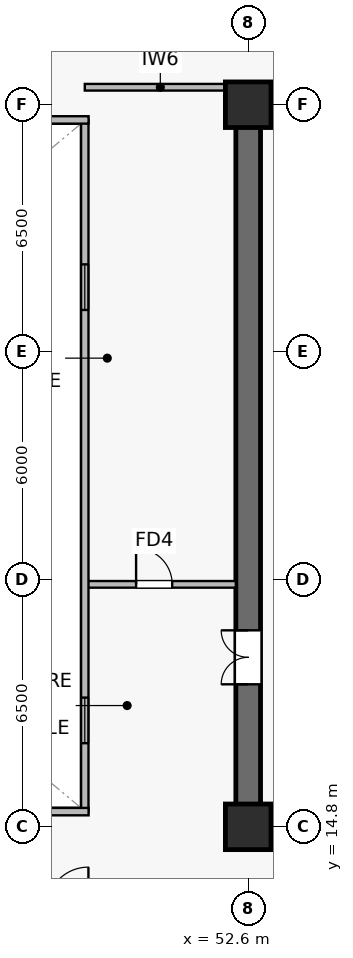
"""IFC4 building model, lengths in metres.
Left out: names, types, materials, properties, quantities, classifications, styles, units other than length and angle.
Written with IfcOpenShell. Run it as: python <this file> out.ifc"""

import sys

from ifc_helpers import new_model, si_unit, direction, frame, frame_2d, origin, origin_2d, place, context, subcontext, project, spatial, rectangle, extrude, source, transform, mapped, element, fill, save


model = new_model("IFC4")
c1 = context("Model", 3, precision=1e-05, world=origin(), true_north=direction((0.0, 1.0)))
c2 = subcontext(c1, "Body", "Model", "MODEL_VIEW")
j1 = project(units=[si_unit("LENGTHUNIT", "METRE"), si_unit("PLANEANGLEUNIT", "RADIAN")], contexts=[c1])
p1 = place(None, origin())
s1 = spatial("IfcSite", under=j1, at=p1, CompositionType="ELEMENT")
p2 = place(p1, origin())
s2 = spatial("IfcBuilding", under=s1, at=p2, CompositionType="ELEMENT")
p3 = place(p2, frame((0.0, 0.0, 170.7)))
s3 = spatial("IfcBuildingStorey", under=s2, at=p3, CompositionType="ELEMENT", Elevation=170.7)
p4 = place(p3, frame((52.275, 14.8, 0.0), z_axis=(0.0, 0.0, 1.0), x_axis=(1.0, 0.0, 0.0)))
e1 = element("IfcWall", 1, at=p4, inside=s3, PredefinedType="SHEAR", context=c2, shape_type="SweptSolid", body=[
    extrude(rectangle(XDim=15.45, YDim=0.65, at=frame_2d((7.725, 0.0))), origin(), (0.0, 0.0, 1.0), 3.79),
])
p5 = place(p3, frame((52.275, 33.8, 0.0), z_axis=(0.0, 0.0, 1.0), x_axis=(1.0, 0.0, 0.0)))
e2 = element("IfcWall", 2, at=p5, inside=s3, PredefinedType="SHEAR", context=c2, shape_type="SweptSolid", body=[
    extrude(rectangle(XDim=15.45, YDim=0.65, at=frame_2d((7.725, 0.0))), origin(), (0.0, 0.0, 1.0), 3.79),
])
p6 = place(p5, frame((9.25, 0.0, 0.0)))
e3 = element("IfcOpeningElement", 3, at=p6, cuts=e2, PredefinedType="OPENING", context=c2, shape_type="SweptSolid", body=[
    extrude(rectangle(XDim=0.95, YDim=2.15, at=frame_2d((0.475, 1.075))), frame((0.0, 0.335, 0.0), z_axis=(0.0, -1.0, 0.0), x_axis=(1.0, 0.0, 0.0)), (0.0, 0.0, 1.0), 0.67),
])
p7 = place(p5, frame((6.735, 0.0, 0.0)))
e4 = element("IfcOpeningElement", 4, at=p7, cuts=e2, PredefinedType="OPENING", context=c2, shape_type="SweptSolid", body=[
    extrude(rectangle(XDim=0.95, YDim=2.15, at=frame_2d((0.475, 1.075))), frame((0.0, 0.335, 0.0), z_axis=(0.0, -1.0, 0.0), x_axis=(1.0, 0.0, 0.0)), (0.0, 0.0, 1.0), 0.67),
])
p8 = place(p5, frame((4.185, 0.0, 0.0)))
e5 = element("IfcOpeningElement", 5, at=p8, cuts=e2, PredefinedType="OPENING", context=c2, shape_type="SweptSolid", body=[
    extrude(rectangle(XDim=0.95, YDim=2.15, at=frame_2d((0.475, 1.075))), frame((0.0, 0.335, 0.0), z_axis=(0.0, -1.0, 0.0), x_axis=(1.0, 0.0, 0.0)), (0.0, 0.0, 1.0), 0.67),
])
p9 = place(p5, frame((1.635, 0.0, 0.0)))
e6 = element("IfcOpeningElement", 6, at=p9, cuts=e2, PredefinedType="OPENING", context=c2, shape_type="SweptSolid", body=[
    extrude(rectangle(XDim=0.95, YDim=2.15, at=frame_2d((0.475, 1.075))), frame((0.0, 0.335, 0.0), z_axis=(0.0, -1.0, 0.0), x_axis=(1.0, 0.0, 0.0)), (0.0, 0.0, 1.0), 0.67),
])
p10 = place(p3, frame((52.6, 15.125, 0.0), z_axis=(0.0, 0.0, 1.0), x_axis=(0.0, 1.0, 0.0)))
e7 = element("IfcWall", 7, at=p10, inside=s3, PredefinedType="SHEAR", context=c2, shape_type="SweptSolid", body=[
    extrude(rectangle(XDim=18.35, YDim=0.65, at=frame_2d((9.175, 0.0))), origin(), (0.0, 0.0, 1.0), 3.79),
])
p11 = place(p10, frame((3.425, 0.0, 0.0)))
e8 = element("IfcOpeningElement", 8, at=p11, cuts=e7, PredefinedType="OPENING", context=c2, shape_type="SweptSolid", body=[
    extrude(rectangle(XDim=1.42, YDim=2.2, at=frame_2d((0.71, 1.1))), frame((0.0, 0.335, 0.0), z_axis=(0.0, -1.0, 0.0), x_axis=(1.0, 0.0, 0.0)), (0.0, 0.0, 1.0), 0.67),
])
m1 = source(origin(), c2, "Body", "SweptSolid", [
    extrude(rectangle(XDim=1.2, YDim=1.2, at=origin_2d()), origin(), (0.0, 0.0, 1.0), 4.1),
])
for number, where, z_axis, x_axis in (
    (9, (52.6, 14.8, 0.0), (0.0, 0.0, 1.0), (1.0, 0.0, 0.0)),
    (10, (52.6, 33.8, 0.0), (0.0, 0.0, 1.0), (1.0, 0.0, 0.0)),
):
    element("IfcColumn", number, at=place(p3, frame(where, z_axis=z_axis, x_axis=x_axis)), inside=s3, PredefinedType="COLUMN", context=c2, shape_type="MappedRepresentation", body=[
        mapped(m1, transform((0.0, 0.0, 0.0), scale=1.0)),
    ])
p12 = place(p3, frame((48.3, 34.26, 0.0), z_axis=(0.0, 0.0, 1.0), x_axis=(1.0, 0.0, 0.0)))
e11 = element("IfcWall", 11, at=p12, inside=s3, PredefinedType="PARTITIONING", context=c2, shape_type="SweptSolid", body=[
    extrude(rectangle(XDim=3.975, YDim=0.175, at=frame_2d((1.987, 0.0))), origin(), (0.0, 0.0, 1.0), 3.475),
])
p13 = place(p3, frame((48.3, 21.18, 0.0), z_axis=(0.0, 0.0, 1.0), x_axis=(1.0, 0.0, 0.0)))
e12 = element("IfcWall", 12, at=p13, inside=s3, PredefinedType="PARTITIONING", context=c2, shape_type="SweptSolid", body=[
    extrude(rectangle(XDim=3.975, YDim=0.175, at=frame_2d((1.987, 0.0))), origin(), (0.0, 0.0, 1.0), 3.79),
])
p14 = place(p13, frame((1.35, 0.0, 0.0)))
e13 = element("IfcOpeningElement", 13, at=p14, cuts=e12, PredefinedType="OPENING", context=c2, shape_type="SweptSolid", body=[
    extrude(rectangle(XDim=0.95, YDim=2.15, at=frame_2d((0.475, 1.075))), frame((0.0, 0.098, 0.0), z_axis=(0.0, -1.0, 0.0), x_axis=(1.0, 0.0, 0.0)), (0.0, 0.0, 1.0), 0.195),
])
p15 = place(p3, frame((48.3, 15.2, 0.0), z_axis=(0.0, 0.0, 1.0), x_axis=(0.0, 1.0, 0.0)))
e14 = element("IfcWall", 14, at=p15, inside=s3, PredefinedType="SOLIDWALL", context=c2, shape_type="SweptSolid", body=[
    extrude(rectangle(XDim=18.2, YDim=0.195, at=frame_2d((9.1, 0.0))), origin(), (0.0, 0.0, 1.0), 3.79),
])
p16 = place(p15, frame((1.8, 0.0, 0.9)))
e15 = element("IfcOpeningElement", 15, at=p16, cuts=e14, PredefinedType="OPENING", context=c2, shape_type="SweptSolid", body=[
    extrude(rectangle(XDim=1.2, YDim=1.35, at=frame_2d((0.6, 0.675))), frame((0.0, 0.107, 0.0), z_axis=(0.0, -1.0, 0.0), x_axis=(1.0, 0.0, 0.0)), (0.0, 0.0, 1.0), 0.215),
])
p17 = place(p15, frame((13.2, 0.0, 0.9)))
e16 = element("IfcOpeningElement", 16, at=p17, cuts=e14, PredefinedType="OPENING", context=c2, shape_type="SweptSolid", body=[
    extrude(rectangle(XDim=1.2, YDim=1.35, at=frame_2d((0.6, 0.675))), frame((0.0, 0.107, 0.0), z_axis=(0.0, -1.0, 0.0), x_axis=(1.0, 0.0, 0.0)), (0.0, 0.0, 1.0), 0.215),
])
for number, where, z_axis, x_axis in (
    (17, (26.4, 15.2, 0.0), (0.0, 0.0, 1.0), (1.0, 0.0, 0.0)),
    (18, (26.4, 33.4, 0.0), (0.0, 0.0, 1.0), (1.0, 0.0, 0.0)),
):
    element("IfcWall", number, at=place(p3, frame(where, z_axis=z_axis, x_axis=x_axis)), inside=s3, PredefinedType="SOLIDWALL", context=c2, shape_type="SweptSolid", body=[
        extrude(rectangle(XDim=22.0, YDim=0.195, at=frame_2d((11.0, 0.0))), origin(), (0.0, 0.0, 1.0), 3.79),
    ])
m2 = source(origin(), c2, "Body", "SweptSolid", [
    extrude(rectangle(XDim=1.2, YDim=1.35, at=frame_2d((0.6, 0.675))), frame((0.0, 0.03, 0.0), z_axis=(0.0, -1.0, 0.0), x_axis=(1.0, 0.0, 0.0)), (0.0, 0.0, 1.0), 0.06),
])
p18 = place(p16, origin())
e19 = element("IfcWindow", 19, at=p18, inside=s3, PartitioningType="SINGLE_PANEL", PredefinedType="WINDOW", context=c2, shape_type="MappedRepresentation", body=[
    mapped(m2, transform((0.0, 0.0, 0.0), scale=1.0)),
])
fill(e15, e19)
p19 = place(p17, origin())
e20 = element("IfcWindow", 20, at=p19, inside=s3, PartitioningType="SINGLE_PANEL", PredefinedType="WINDOW", context=c2, shape_type="MappedRepresentation", body=[
    mapped(m2, transform((0.0, 0.0, 0.0), scale=1.0)),
])
fill(e16, e20)
m3 = source(origin(), c2, "Body", "SweptSolid", [
    extrude(rectangle(XDim=1.42, YDim=2.2, at=frame_2d((0.71, 1.1))), frame((0.0, 0.025, 0.0), z_axis=(0.0, -1.0, 0.0), x_axis=(1.0, 0.0, 0.0)), (0.0, 0.0, 1.0), 0.05),
])
p20 = place(p11, origin())
e21 = element("IfcDoor", 21, at=p20, inside=s3, OperationType="DOUBLE_DOOR_SINGLE_SWING", PredefinedType="DOOR", context=c2, shape_type="MappedRepresentation", body=[
    mapped(m3, transform((0.0, 0.0, 0.0), scale=1.0)),
])
fill(e8, e21)
m4 = source(origin(), c2, "Body", "SweptSolid", [
    extrude(rectangle(XDim=0.95, YDim=2.15, at=frame_2d((0.475, 1.075))), frame((0.0, 0.025, 0.0), z_axis=(0.0, -1.0, 0.0), x_axis=(1.0, 0.0, 0.0)), (0.0, 0.0, 1.0), 0.05),
])
p21 = place(p14, origin())
e22 = element("IfcDoor", 22, at=p21, inside=s3, OperationType="SINGLE_SWING_LEFT", PredefinedType="DOOR", context=c2, shape_type="MappedRepresentation", body=[
    mapped(m4, transform((0.0, 0.0, 0.0), scale=1.0)),
])
fill(e13, e22)
save(model, sys.argv[1])
